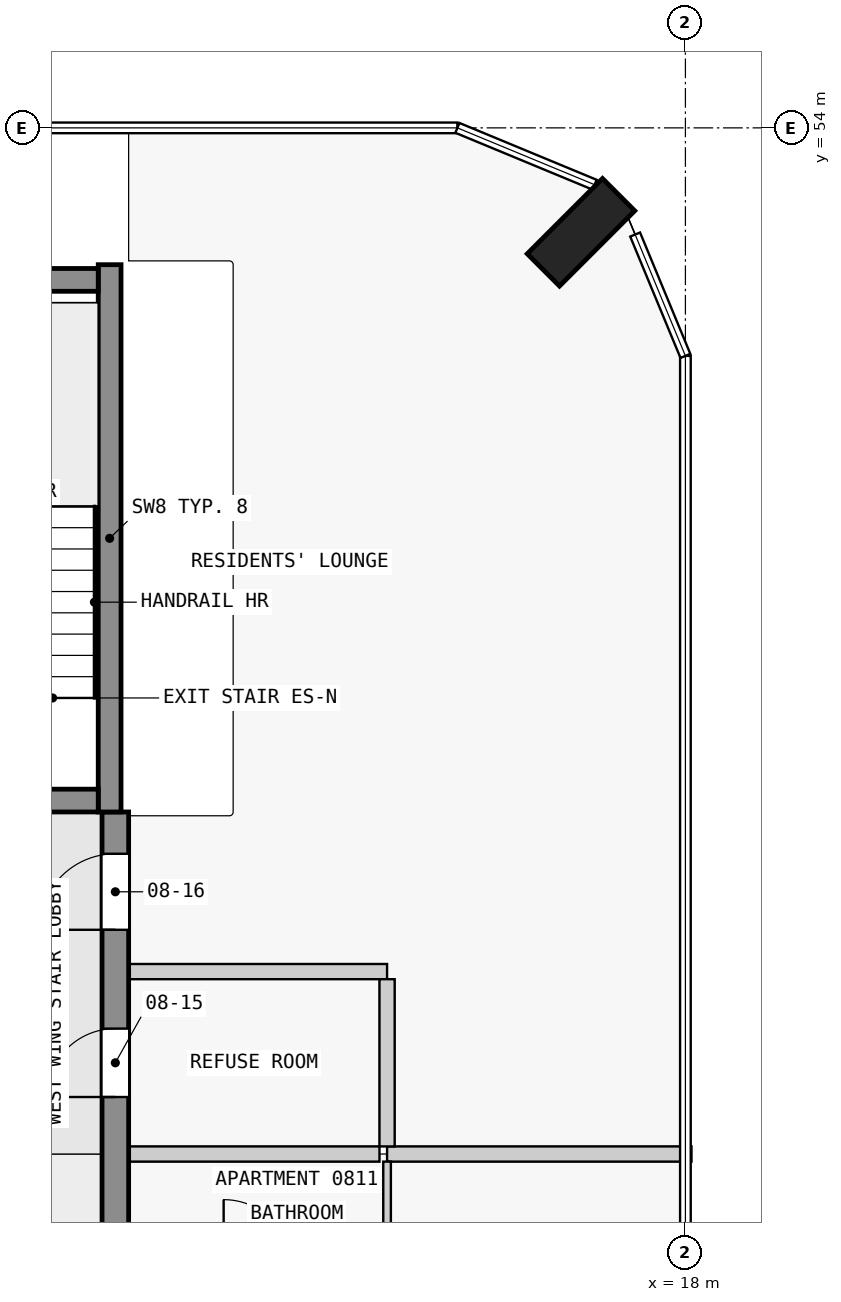
"""IFC4 building model, lengths in metres.
Left out: names, types, materials, properties, quantities, classifications, styles, units other than length and angle.
Written with IfcOpenShell. Run it as: python <this file> out.ifc"""

import sys

from ifc_helpers import new_model, si_unit, direction, frame, frame_2d, origin, origin_2d, place, context, subcontext, project, spatial, rectangle, extrude, element, fill, save


model = new_model("IFC4")
c1 = context("Model", 3, precision=1e-05, world=origin(), true_north=direction((0.0, 1.0)))
c2 = subcontext(c1, "Body", "Model", "MODEL_VIEW")
j1 = project(units=[si_unit("LENGTHUNIT", "METRE"), si_unit("PLANEANGLEUNIT", "RADIAN")], contexts=[c1])
p1 = place(None, origin())
s1 = spatial("IfcSite", under=j1, at=p1, CompositionType="ELEMENT")
p2 = place(p1, origin())
s2 = spatial("IfcBuilding", under=s1, at=p2, CompositionType="ELEMENT")
p3 = place(p2, frame((0.0, 0.0, 37.3)))
s3 = spatial("IfcBuildingStorey", under=s2, at=p3, CompositionType="ELEMENT", Elevation=37.3)
p4 = place(p3, frame((16.626, 52.626, 0.0), z_axis=(0.0, 0.0, 1.0), x_axis=(-0.707106781187, 0.707106781187, 0.0)))
e1 = element("IfcColumn", 1, at=p4, inside=s3, PredefinedType="COLUMN", context=c2, shape_type="SweptSolid", body=[
    extrude(rectangle(XDim=0.6, YDim=1.4, at=origin_2d()), origin(), (0.0, 0.0, 1.0), 3.5),
])
p5 = place(p3, frame((7.725, 45.15, 0.0), z_axis=(0.0, 0.0, 1.0), x_axis=(1.0, 0.0, 0.0)))
e2 = element("IfcWall", 2, at=p5, inside=s3, PredefinedType="SHEAR", context=c2, shape_type="SweptSolid", body=[
    extrude(rectangle(XDim=2.55, YDim=0.3, at=frame_2d((1.275, 0.0))), origin(), (0.0, 0.0, 1.0), 3.5),
])
p6 = place(p5, frame((0.725, 0.0, 0.0)))
e3 = element("IfcOpeningElement", 3, at=p6, cuts=e2, PredefinedType="OPENING", context=c2, shape_type="SweptSolid", body=[
    extrude(rectangle(XDim=1.1, YDim=2.1, at=frame_2d((0.55, 1.05))), frame((0.0, 0.16, 0.0), z_axis=(0.0, -1.0, 0.0), x_axis=(1.0, 0.0, 0.0)), (0.0, 0.0, 1.0), 0.32),
])
p7 = place(p3, frame((7.725, 52.0, 0.0), z_axis=(0.0, 0.0, 1.0), x_axis=(1.0, 0.0, 0.0)))
e4 = element("IfcWall", 4, at=p7, inside=s3, PredefinedType="SHEAR", context=c2, shape_type="SweptSolid", body=[
    extrude(rectangle(XDim=2.55, YDim=0.3, at=frame_2d((1.275, 0.0))), origin(), (0.0, 0.0, 1.0), 3.5),
])
p8 = place(p3, frame((10.425, 45.0, 0.0), z_axis=(0.0, 0.0, 1.0), x_axis=(0.0, 1.0, 0.0)))
e5 = element("IfcWall", 5, at=p8, inside=s3, PredefinedType="SHEAR", context=c2, shape_type="SweptSolid", body=[
    extrude(rectangle(XDim=7.2, YDim=0.3, at=frame_2d((3.6, 0.0))), origin(), (0.0, 0.0, 1.0), 3.5),
])
p9 = place(p3, frame((10.5, 18.0, 0.0), z_axis=(0.0, 0.0, 1.0), x_axis=(0.0, 1.0, 0.0)))
e6 = element("IfcWall", 6, at=p9, inside=s3, PredefinedType="SHEAR", context=c2, shape_type="SweptSolid", body=[
    extrude(rectangle(XDim=27.0, YDim=0.35, at=frame_2d((13.5, 0.0))), origin(), (0.0, 0.0, 1.0), 3.25),
])
p10 = place(p9, frame((7.45, 0.0, 0.0)))
e7 = element("IfcOpeningElement", 7, at=p10, cuts=e6, PredefinedType="OPENING", context=c2, shape_type="SweptSolid", body=[
    extrude(rectangle(XDim=1.0, YDim=2.1, at=frame_2d((0.5, 1.05))), frame((0.0, 0.185, 0.0), z_axis=(0.0, -1.0, 0.0), x_axis=(1.0, 0.0, 0.0)), (0.0, 0.0, 1.0), 0.37),
])
p11 = place(p9, frame((19.75, 0.0, 0.0)))
e8 = element("IfcOpeningElement", 8, at=p11, cuts=e6, PredefinedType="OPENING", context=c2, shape_type="SweptSolid", body=[
    extrude(rectangle(XDim=1.0, YDim=2.1, at=frame_2d((0.5, 1.05))), frame((0.0, 0.185, 0.0), z_axis=(0.0, -1.0, 0.0), x_axis=(1.0, 0.0, 0.0)), (0.0, 0.0, 1.0), 0.37),
])
p12 = place(p9, frame((23.25, 0.0, 0.0)))
e9 = element("IfcOpeningElement", 9, at=p12, cuts=e6, PredefinedType="OPENING", context=c2, shape_type="SweptSolid", body=[
    extrude(rectangle(XDim=0.9, YDim=2.1, at=frame_2d((0.45, 1.05))), frame((0.0, 0.185, 0.0), z_axis=(0.0, -1.0, 0.0), x_axis=(1.0, 0.0, 0.0)), (0.0, 0.0, 1.0), 0.37),
])
p13 = place(p9, frame((25.45, 0.0, 0.0)))
e10 = element("IfcOpeningElement", 10, at=p13, cuts=e6, PredefinedType="OPENING", context=c2, shape_type="SweptSolid", body=[
    extrude(rectangle(XDim=1.0, YDim=2.1, at=frame_2d((0.5, 1.05))), frame((0.0, 0.185, 0.0), z_axis=(0.0, -1.0, 0.0), x_axis=(1.0, 0.0, 0.0)), (0.0, 0.0, 1.0), 0.37),
])
p14 = place(p3, frame((13.975, 40.5, 0.0), z_axis=(0.0, 0.0, 1.0), x_axis=(-1.0, 0.0, 0.0)))
e11 = element("IfcWall", 11, at=p14, inside=s3, PredefinedType="PARTITIONING", context=c2, shape_type="SweptSolid", body=[
    extrude(rectangle(XDim=3.3, YDim=0.2, at=frame_2d((1.65, 0.0))), origin(), (0.0, 0.0, 1.0), 3.25),
])
p15 = place(p3, frame((14.075, 40.5, 0.0), z_axis=(0.0, 0.0, 1.0), x_axis=(1.0, 0.0, 0.0)))
e12 = element("IfcWall", 12, at=p15, inside=s3, PredefinedType="PARTITIONING", context=c2, shape_type="SweptSolid", body=[
    extrude(rectangle(XDim=4.005, YDim=0.2, at=frame_2d((2.002, 0.0))), origin(), (0.0, 0.0, 1.0), 3.25),
])
p16 = place(p3, frame((14.075, 42.9, 0.0), z_axis=(0.0, 0.0, 1.0), x_axis=(-1.0, 0.0, 0.0)))
e13 = element("IfcWall", 13, at=p16, inside=s3, PredefinedType="PARTITIONING", context=c2, shape_type="SweptSolid", body=[
    extrude(rectangle(XDim=3.4, YDim=0.2, at=frame_2d((1.7, 0.0))), origin(), (0.0, 0.0, 1.0), 3.25),
])
p17 = place(p3, frame((14.075, 39.05, 0.0), z_axis=(0.0, 0.0, 1.0), x_axis=(0.0, 1.0, 0.0)))
e14 = element("IfcWall", 14, at=p17, inside=s3, PredefinedType="PARTITIONING", context=c2, shape_type="SweptSolid", body=[
    extrude(rectangle(XDim=1.35, YDim=0.1, at=frame_2d((0.675, 0.0))), origin(), (0.0, 0.0, 1.0), 3.25),
])
p18 = place(p3, frame((14.075, 40.6, 0.0), z_axis=(0.0, 0.0, 1.0), x_axis=(0.0, 1.0, 0.0)))
e15 = element("IfcWall", 15, at=p18, inside=s3, PredefinedType="PARTITIONING", context=c2, shape_type="SweptSolid", body=[
    extrude(rectangle(XDim=2.2, YDim=0.2, at=frame_2d((1.1, 0.0))), origin(), (0.0, 0.0, 1.0), 3.25),
])
p19 = place(p12, origin())
e16 = element("IfcDoor", 16, at=p19, inside=s3, OperationType="SINGLE_SWING_RIGHT", PredefinedType="DOOR", context=c2, shape_type="SweptSolid", body=[
    extrude(rectangle(XDim=0.9, YDim=2.1, at=frame_2d((0.45, 1.05))), frame((0.0, 0.025, 0.0), z_axis=(0.0, -1.0, 0.0), x_axis=(1.0, 0.0, 0.0)), (0.0, 0.0, 1.0), 0.05),
])
fill(e9, e16)
p20 = place(p13, origin())
e17 = element("IfcDoor", 17, at=p20, inside=s3, OperationType="SINGLE_SWING_RIGHT", PredefinedType="DOOR", context=c2, shape_type="SweptSolid", body=[
    extrude(rectangle(XDim=1.0, YDim=2.1, at=frame_2d((0.5, 1.05))), frame((0.0, 0.025, 0.0), z_axis=(0.0, -1.0, 0.0), x_axis=(1.0, 0.0, 0.0)), (0.0, 0.0, 1.0), 0.05),
])
fill(e10, e17)
save(model, sys.argv[1])
